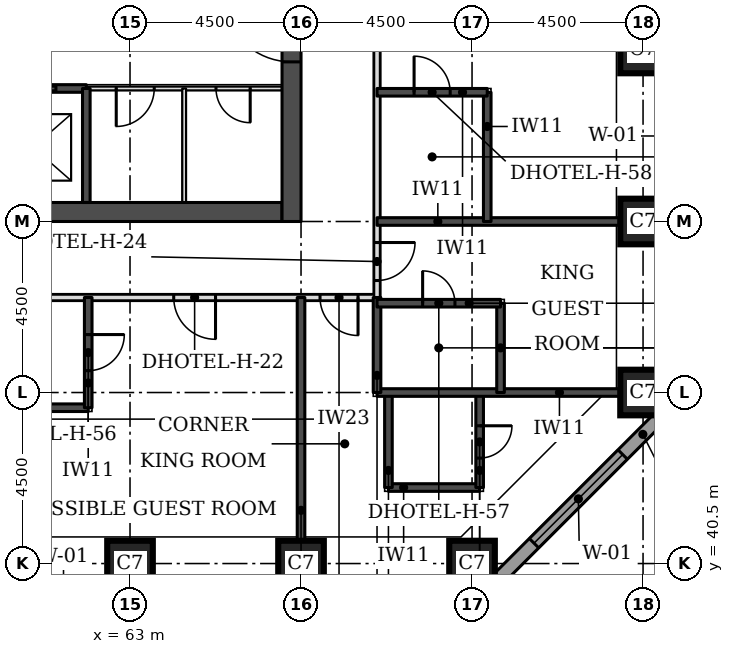
"""IFC4 building model, lengths in metres.
Left out: names, types, materials, properties, quantities, classifications, styles, units other than length and angle.
Written with IfcOpenShell. Run it as: python <this file> out.ifc"""

import sys

from ifc_helpers import new_model, si_unit, direction, frame, frame_2d, origin, origin_2d, place, context, subcontext, project, spatial, rectangle, extrude, element, fill, save


model = new_model("IFC4")
c1 = context("Model", 3, precision=1e-05, world=origin(), true_north=direction((0.0, 1.0)))
c2 = subcontext(c1, "Body", "Model", "MODEL_VIEW")
j1 = project(units=[si_unit("LENGTHUNIT", "METRE"), si_unit("PLANEANGLEUNIT", "RADIAN")], contexts=[c1])
p1 = place(None, origin())
s1 = spatial("IfcSite", under=j1, at=p1, CompositionType="ELEMENT")
p2 = place(p1, origin())
s2 = spatial("IfcBuilding", under=s1, at=p2, CompositionType="ELEMENT")
p3 = place(p2, frame((0.0, 0.0, 46.2)))
s3 = spatial("IfcBuildingStorey", under=s2, at=p3, CompositionType="ELEMENT", Elevation=46.2)
for number, where, z_axis, x_axis in (
    (1, (63.0, 40.5, 0.0), (0.0, 0.0, 1.0), (1.0, 0.0, 0.0)),
    (2, (67.5, 40.5, 0.0), (0.0, 0.0, 1.0), (1.0, 0.0, 0.0)),
    (3, (72.0, 40.5, 0.0), (0.0, 0.0, 1.0), (1.0, 0.0, 0.0)),
    (4, (76.5, 45.0, 0.0), (0.0, 0.0, 1.0), (1.0, 0.0, 0.0)),
    (5, (76.5, 49.5, 0.0), (0.0, 0.0, 1.0), (1.0, 0.0, 0.0)),
    (6, (76.5, 54.0, 0.0), (0.0, 0.0, 1.0), (1.0, 0.0, 0.0)),
):
    element("IfcColumn", number, at=place(p3, frame(where, z_axis=z_axis, x_axis=x_axis)), inside=s3, PredefinedType="COLUMN", context=c2, shape_type="SweptSolid", body=[
        extrude(rectangle(XDim=1.2, YDim=1.2, at=origin_2d()), origin(), (0.0, 0.0, 1.0), 3.3),
    ])
p4 = place(p3, frame((45.5, 49.75, 0.0), z_axis=(0.0, 0.0, 1.0), x_axis=(1.0, 0.0, 0.0)))
e7 = element("IfcWall", 7, at=p4, inside=s3, PredefinedType="SHEAR", context=c2, shape_type="SweptSolid", body=[
    extrude(rectangle(XDim=21.5, YDim=0.5, at=frame_2d((10.75, 0.0))), origin(), (0.0, 0.0, 1.0), 3.3),
])
p5 = place(p3, frame((67.25, 49.5, 0.0), z_axis=(0.0, 0.0, 1.0), x_axis=(0.0, 1.0, 0.0)))
e8 = element("IfcWall", 8, at=p5, inside=s3, PredefinedType="SHEAR", context=c2, shape_type="SweptSolid", body=[
    extrude(rectangle(XDim=22.5, YDim=0.5, at=frame_2d((11.25, 0.0))), origin(), (0.0, 0.0, 1.0), 3.3),
])
p6 = place(p5, frame((4.2, 0.0, 0.0)))
e9 = element("IfcOpeningElement", 9, at=p6, cuts=e8, PredefinedType="OPENING", context=c2, shape_type="SweptSolid", body=[
    extrude(rectangle(XDim=1.8, YDim=2.1, at=frame_2d((0.9, 1.05))), frame((0.0, 0.26, 0.0), z_axis=(0.0, -1.0, 0.0), x_axis=(1.0, 0.0, 0.0)), (0.0, 0.0, 1.0), 0.52),
])
p7 = place(p5, frame((6.9, 0.0, 0.0)))
e10 = element("IfcOpeningElement", 10, at=p7, cuts=e8, PredefinedType="OPENING", context=c2, shape_type="SweptSolid", body=[
    extrude(rectangle(XDim=1.1, YDim=2.1, at=frame_2d((0.55, 1.05))), frame((0.0, 0.26, 0.0), z_axis=(0.0, -1.0, 0.0), x_axis=(1.0, 0.0, 0.0)), (0.0, 0.0, 1.0), 0.52),
])
p8 = place(p5, frame((13.6, 0.0, 0.0)))
e11 = element("IfcOpeningElement", 11, at=p8, cuts=e8, PredefinedType="OPENING", context=c2, shape_type="SweptSolid", body=[
    extrude(rectangle(XDim=1.1, YDim=2.1, at=frame_2d((0.55, 1.05))), frame((0.0, 0.26, 0.0), z_axis=(0.0, -1.0, 0.0), x_axis=(1.0, 0.0, 0.0)), (0.0, 0.0, 1.0), 0.52),
])
p9 = place(p5, frame((16.5, 0.0, 0.0)))
e12 = element("IfcOpeningElement", 12, at=p9, cuts=e8, PredefinedType="OPENING", context=c2, shape_type="SweptSolid", body=[
    extrude(rectangle(XDim=1.8, YDim=2.1, at=frame_2d((0.9, 1.05))), frame((0.0, 0.26, 0.0), z_axis=(0.0, -1.0, 0.0), x_axis=(1.0, 0.0, 0.0)), (0.0, 0.0, 1.0), 0.52),
])
p10 = place(p3, frame((72.27, 39.674, 0.0), z_axis=(0.0, 0.0, 1.0), x_axis=(0.707106781187, 0.707106781187, 0.0)))
e13 = element("IfcWall", 13, at=p10, inside=s3, PredefinedType="STANDARD", context=c2, shape_type="SweptSolid", body=[
    extrude(rectangle(XDim=7.151, YDim=0.35, at=frame_2d((3.576, 0.0))), origin(), (0.0, 0.0, 1.0), 3.055),
])
p11 = place(p10, frame((1.926, 0.0, 0.8)))
e14 = element("IfcOpeningElement", 14, at=p11, cuts=e13, PredefinedType="OPENING", context=c2, shape_type="SweptSolid", body=[
    extrude(rectangle(XDim=3.3, YDim=1.5, at=frame_2d((1.65, 0.75))), frame((0.0, 0.185, 0.0), z_axis=(0.0, -1.0, 0.0), x_axis=(1.0, 0.0, 0.0)), (0.0, 0.0, 1.0), 0.37),
])
p12 = place(p3, frame((51.5, 47.5, 0.0), z_axis=(0.0, 0.0, 1.0), x_axis=(1.0, 0.0, 0.0)))
e15 = element("IfcWall", 15, at=p12, inside=s3, PredefinedType="PARTITIONING", context=c2, shape_type="SweptSolid", body=[
    extrude(rectangle(XDim=18.0, YDim=0.15, at=frame_2d((9.0, 0.0))), origin(), (0.0, 0.0, 1.0), 3.08),
])
p13 = place(p12, frame((12.65, 0.0, 0.0)))
e16 = element("IfcOpeningElement", 16, at=p13, cuts=e15, PredefinedType="OPENING", context=c2, shape_type="SweptSolid", body=[
    extrude(rectangle(XDim=1.1, YDim=2.1, at=frame_2d((0.55, 1.05))), frame((0.0, 0.085, 0.0), z_axis=(0.0, -1.0, 0.0), x_axis=(1.0, 0.0, 0.0)), (0.0, 0.0, 1.0), 0.17),
])
p14 = place(p12, frame((16.5, 0.0, 0.0)))
e17 = element("IfcOpeningElement", 17, at=p14, cuts=e15, PredefinedType="OPENING", context=c2, shape_type="SweptSolid", body=[
    extrude(rectangle(XDim=1.0, YDim=2.1, at=frame_2d((0.5, 1.05))), frame((0.0, 0.085, 0.0), z_axis=(0.0, -1.0, 0.0), x_axis=(1.0, 0.0, 0.0)), (0.0, 0.0, 1.0), 0.17),
])
p15 = place(p12, frame((4.21, 0.0, 0.0)))
e18 = element("IfcOpeningElement", 18, at=p15, cuts=e15, PredefinedType="OPENING", context=c2, shape_type="SweptSolid", body=[
    extrude(rectangle(XDim=1.0, YDim=2.1, at=frame_2d((0.5, 1.05))), frame((0.0, 0.085, 0.0), z_axis=(0.0, -1.0, 0.0), x_axis=(1.0, 0.0, 0.0)), (0.0, 0.0, 1.0), 0.17),
])
p16 = place(p3, frame((69.5, 47.5, 0.0), z_axis=(0.0, 0.0, 1.0), x_axis=(0.0, 1.0, 0.0)))
e19 = element("IfcWall", 19, at=p16, inside=s3, PredefinedType="PARTITIONING", context=c2, shape_type="SweptSolid", body=[
    extrude(rectangle(XDim=26.5, YDim=0.15, at=frame_2d((13.25, 0.0))), origin(), (0.0, 0.0, 1.0), 3.08),
])
p17 = place(p16, frame((25.053, 0.0, 0.0)))
e20 = element("IfcOpeningElement", 20, at=p17, cuts=e19, PredefinedType="OPENING", context=c2, shape_type="SweptSolid", body=[
    extrude(rectangle(XDim=1.0, YDim=2.1, at=frame_2d((0.5, 1.05))), frame((0.0, 0.085, 0.0), z_axis=(0.0, -1.0, 0.0), x_axis=(1.0, 0.0, 0.0)), (0.0, 0.0, 1.0), 0.17),
])
p18 = place(p16, frame((20.575, 0.0, 0.0)))
e21 = element("IfcOpeningElement", 21, at=p18, cuts=e19, PredefinedType="OPENING", context=c2, shape_type="SweptSolid", body=[
    extrude(rectangle(XDim=1.0, YDim=2.1, at=frame_2d((0.5, 1.05))), frame((0.0, 0.085, 0.0), z_axis=(0.0, -1.0, 0.0), x_axis=(1.0, 0.0, 0.0)), (0.0, 0.0, 1.0), 0.17),
])
p19 = place(p16, frame((18.175, 0.0, 0.0)))
e22 = element("IfcOpeningElement", 22, at=p19, cuts=e19, PredefinedType="OPENING", context=c2, shape_type="SweptSolid", body=[
    extrude(rectangle(XDim=1.0, YDim=2.1, at=frame_2d((0.5, 1.05))), frame((0.0, 0.085, 0.0), z_axis=(0.0, -1.0, 0.0), x_axis=(1.0, 0.0, 0.0)), (0.0, 0.0, 1.0), 0.17),
])
p20 = place(p16, frame((11.575, 0.0, 0.0)))
e23 = element("IfcOpeningElement", 23, at=p20, cuts=e19, PredefinedType="OPENING", context=c2, shape_type="SweptSolid", body=[
    extrude(rectangle(XDim=1.0, YDim=2.1, at=frame_2d((0.5, 1.05))), frame((0.0, 0.085, 0.0), z_axis=(0.0, -1.0, 0.0), x_axis=(1.0, 0.0, 0.0)), (0.0, 0.0, 1.0), 0.17),
])
p21 = place(p16, frame((7.65, 0.0, 0.0)))
e24 = element("IfcOpeningElement", 24, at=p21, cuts=e19, PredefinedType="OPENING", context=c2, shape_type="SweptSolid", body=[
    extrude(rectangle(XDim=1.1, YDim=2.1, at=frame_2d((0.55, 1.05))), frame((0.0, 0.085, 0.0), z_axis=(0.0, -1.0, 0.0), x_axis=(1.0, 0.0, 0.0)), (0.0, 0.0, 1.0), 0.17),
])
p22 = place(p16, frame((0.447, 0.0, 0.0)))
e25 = element("IfcOpeningElement", 25, at=p22, cuts=e19, PredefinedType="OPENING", context=c2, shape_type="SweptSolid", body=[
    extrude(rectangle(XDim=1.0, YDim=2.1, at=frame_2d((0.5, 1.05))), frame((0.0, 0.085, 0.0), z_axis=(0.0, -1.0, 0.0), x_axis=(1.0, 0.0, 0.0)), (0.0, 0.0, 1.0), 0.17),
])
p23 = place(p3, frame((67.5, 41.1, 0.0), z_axis=(0.0, 0.0, 1.0), x_axis=(0.0, 1.0, 0.0)))
e26 = element("IfcWall", 26, at=p23, inside=s3, PredefinedType="SOLIDWALL", context=c2, shape_type="SweptSolid", body=[
    extrude(rectangle(XDim=6.4, YDim=0.2, at=frame_2d((3.2, 0.0))), origin(), (0.0, 0.0, 1.0), 3.08),
])
p24 = place(p3, frame((69.8, 42.5, 0.0), z_axis=(0.0, 0.0, 1.0), x_axis=(1.0, 0.0, 0.0)))
e27 = element("IfcWall", 27, at=p24, inside=s3, PredefinedType="SOLIDWALL", context=c2, shape_type="SweptSolid", body=[
    extrude(rectangle(XDim=2.4, YDim=0.2, at=frame_2d((1.2, 0.0))), origin(), (0.0, 0.0, 1.0), 3.08),
])
p25 = place(p3, frame((69.8, 42.5, 0.0), z_axis=(0.0, 0.0, 1.0), x_axis=(0.0, 1.0, 0.0)))
e28 = element("IfcWall", 28, at=p25, inside=s3, PredefinedType="SOLIDWALL", context=c2, shape_type="SweptSolid", body=[
    extrude(rectangle(XDim=2.5, YDim=0.2, at=frame_2d((1.25, 0.0))), origin(), (0.0, 0.0, 1.0), 3.08),
])
p26 = place(p3, frame((72.2, 42.5, 0.0), z_axis=(0.0, 0.0, 1.0), x_axis=(0.0, 1.0, 0.0)))
e29 = element("IfcWall", 29, at=p26, inside=s3, PredefinedType="SOLIDWALL", context=c2, shape_type="SweptSolid", body=[
    extrude(rectangle(XDim=2.5, YDim=0.2, at=frame_2d((1.25, 0.0))), origin(), (0.0, 0.0, 1.0), 3.08),
])
p27 = place(p26, frame((0.775, 0.0, 0.0)))
e30 = element("IfcOpeningElement", 30, at=p27, cuts=e29, PredefinedType="OPENING", context=c2, shape_type="SweptSolid", body=[
    extrude(rectangle(XDim=0.85, YDim=2.1, at=frame_2d((0.425, 1.05))), frame((0.0, 0.11, 0.0), z_axis=(0.0, -1.0, 0.0), x_axis=(1.0, 0.0, 0.0)), (0.0, 0.0, 1.0), 0.22),
])
p28 = place(p3, frame((58.5, 44.6, 0.0), z_axis=(0.0, 0.0, 1.0), x_axis=(1.0, 0.0, 0.0)))
e31 = element("IfcWall", 31, at=p28, inside=s3, PredefinedType="SOLIDWALL", context=c2, shape_type="SweptSolid", body=[
    extrude(rectangle(XDim=3.4, YDim=0.2, at=frame_2d((1.7, 0.0))), origin(), (0.0, 0.0, 1.0), 3.08),
])
p29 = place(p3, frame((61.9, 44.6, 0.0), z_axis=(0.0, 0.0, 1.0), x_axis=(0.0, 1.0, 0.0)))
e32 = element("IfcWall", 32, at=p29, inside=s3, PredefinedType="SOLIDWALL", context=c2, shape_type="SweptSolid", body=[
    extrude(rectangle(XDim=2.9, YDim=0.2, at=frame_2d((1.45, 0.0))), origin(), (0.0, 0.0, 1.0), 3.08),
])
p30 = place(p29, frame((0.975, 0.0, 0.0)))
e33 = element("IfcOpeningElement", 33, at=p30, cuts=e32, PredefinedType="OPENING", context=c2, shape_type="SweptSolid", body=[
    extrude(rectangle(XDim=0.95, YDim=2.1, at=frame_2d((0.475, 1.05))), frame((0.0, 0.11, 0.0), z_axis=(0.0, -1.0, 0.0), x_axis=(1.0, 0.0, 0.0)), (0.0, 0.0, 1.0), 0.22),
])
p31 = place(p3, frame((69.5, 45.0, 0.0), z_axis=(0.0, 0.0, 1.0), x_axis=(1.0, 0.0, 0.0)))
e34 = element("IfcWall", 34, at=p31, inside=s3, PredefinedType="SOLIDWALL", context=c2, shape_type="SweptSolid", body=[
    extrude(rectangle(XDim=6.4, YDim=0.2, at=frame_2d((3.2, 0.0))), origin(), (0.0, 0.0, 1.0), 3.08),
])
p32 = place(p3, frame((69.5, 45.0, 0.0), z_axis=(0.0, 0.0, 1.0), x_axis=(0.0, 1.0, 0.0)))
e35 = element("IfcWall", 35, at=p32, inside=s3, PredefinedType="SOLIDWALL", context=c2, shape_type="SweptSolid", body=[
    extrude(rectangle(XDim=2.5, YDim=0.2, at=frame_2d((1.25, 0.0))), origin(), (0.0, 0.0, 1.0), 3.08),
])
p33 = place(p3, frame((72.75, 45.0, 0.0), z_axis=(0.0, 0.0, 1.0), x_axis=(0.0, 1.0, 0.0)))
e36 = element("IfcWall", 36, at=p33, inside=s3, PredefinedType="SOLIDWALL", context=c2, shape_type="SweptSolid", body=[
    extrude(rectangle(XDim=2.35, YDim=0.2, at=frame_2d((1.175, 0.0))), origin(), (0.0, 0.0, 1.0), 3.08),
])
p34 = place(p3, frame((69.5, 47.35, 0.0), z_axis=(0.0, 0.0, 1.0), x_axis=(1.0, 0.0, 0.0)))
e37 = element("IfcWall", 37, at=p34, inside=s3, PredefinedType="SOLIDWALL", context=c2, shape_type="SweptSolid", body=[
    extrude(rectangle(XDim=3.25, YDim=0.2, at=frame_2d((1.625, 0.0))), origin(), (0.0, 0.0, 1.0), 3.08),
])
p35 = place(p34, frame((1.2, 0.0, 0.0)))
e38 = element("IfcOpeningElement", 38, at=p35, cuts=e37, PredefinedType="OPENING", context=c2, shape_type="SweptSolid", body=[
    extrude(rectangle(XDim=0.85, YDim=2.1, at=frame_2d((0.425, 1.05))), frame((0.0, 0.11, 0.0), z_axis=(0.0, -1.0, 0.0), x_axis=(1.0, 0.0, 0.0)), (0.0, 0.0, 1.0), 0.22),
])
p36 = place(p3, frame((69.5, 49.5, 0.0), z_axis=(0.0, 0.0, 1.0), x_axis=(1.0, 0.0, 0.0)))
e39 = element("IfcWall", 39, at=p36, inside=s3, PredefinedType="SOLIDWALL", context=c2, shape_type="SweptSolid", body=[
    extrude(rectangle(XDim=6.4, YDim=0.2, at=frame_2d((3.2, 0.0))), origin(), (0.0, 0.0, 1.0), 3.08),
])
p37 = place(p3, frame((72.4, 49.5, 0.0), z_axis=(0.0, 0.0, 1.0), x_axis=(0.0, 1.0, 0.0)))
e40 = element("IfcWall", 40, at=p37, inside=s3, PredefinedType="SOLIDWALL", context=c2, shape_type="SweptSolid", body=[
    extrude(rectangle(XDim=3.4, YDim=0.2, at=frame_2d((1.7, 0.0))), origin(), (0.0, 0.0, 1.0), 3.08),
])
p38 = place(p3, frame((69.5, 52.9, 0.0), z_axis=(0.0, 0.0, 1.0), x_axis=(1.0, 0.0, 0.0)))
e41 = element("IfcWall", 41, at=p38, inside=s3, PredefinedType="SOLIDWALL", context=c2, shape_type="SweptSolid", body=[
    extrude(rectangle(XDim=2.9, YDim=0.2, at=frame_2d((1.45, 0.0))), origin(), (0.0, 0.0, 1.0), 3.08),
])
p39 = place(p38, frame((0.975, 0.0, 0.0)))
e42 = element("IfcOpeningElement", 42, at=p39, cuts=e41, PredefinedType="OPENING", context=c2, shape_type="SweptSolid", body=[
    extrude(rectangle(XDim=0.95, YDim=2.1, at=frame_2d((0.475, 1.05))), frame((0.0, 0.11, 0.0), z_axis=(0.0, -1.0, 0.0), x_axis=(1.0, 0.0, 0.0)), (0.0, 0.0, 1.0), 0.22),
])
p40 = place(p3, frame((61.85, 53.0, 0.0), z_axis=(0.0, 0.0, 1.0), x_axis=(1.0, 0.0, 0.0)))
e43 = element("IfcWall", 43, at=p40, inside=s3, PredefinedType="PARTITIONING", context=c2, shape_type="SweptSolid", body=[
    extrude(rectangle(XDim=5.15, YDim=0.1, at=frame_2d((2.575, 0.0))), origin(), (0.0, 0.0, 1.0), 3.08),
])
p41 = place(p40, frame((3.413, 0.0, 0.0)))
e44 = element("IfcOpeningElement", 44, at=p41, cuts=e43, PredefinedType="OPENING", context=c2, shape_type="SweptSolid", body=[
    extrude(rectangle(XDim=0.9, YDim=2.1, at=frame_2d((0.45, 1.05))), frame((0.0, 0.06, 0.0), z_axis=(0.0, -1.0, 0.0), x_axis=(1.0, 0.0, 0.0)), (0.0, 0.0, 1.0), 0.12),
])
p42 = place(p40, frame((0.788, 0.0, 0.0)))
e45 = element("IfcOpeningElement", 45, at=p42, cuts=e43, PredefinedType="OPENING", context=c2, shape_type="SweptSolid", body=[
    extrude(rectangle(XDim=1.0, YDim=2.1, at=frame_2d((0.5, 1.05))), frame((0.0, 0.06, 0.0), z_axis=(0.0, -1.0, 0.0), x_axis=(1.0, 0.0, 0.0)), (0.0, 0.0, 1.0), 0.12),
])
p43 = place(p3, frame((50.65, 53.0, 0.0), z_axis=(0.0, 0.0, 1.0), x_axis=(1.0, 0.0, 0.0)))
e46 = element("IfcWall", 46, at=p43, inside=s3, PredefinedType="SOLIDWALL", context=c2, shape_type="SweptSolid", body=[
    extrude(rectangle(XDim=11.2, YDim=0.2, at=frame_2d((5.6, 0.0))), origin(), (0.0, 0.0, 1.0), 3.08),
])
p44 = place(p43, frame((0.8, 0.0, 0.0)))
e47 = element("IfcOpeningElement", 47, at=p44, cuts=e46, PredefinedType="OPENING", context=c2, shape_type="SweptSolid", body=[
    extrude(rectangle(XDim=1.2, YDim=2.1, at=frame_2d((0.6, 1.05))), frame((0.0, 0.11, 0.0), z_axis=(0.0, -1.0, 0.0), x_axis=(1.0, 0.0, 0.0)), (0.0, 0.0, 1.0), 0.22),
])
p45 = place(p43, frame((3.6, 0.0, 0.0)))
e48 = element("IfcOpeningElement", 48, at=p45, cuts=e46, PredefinedType="OPENING", context=c2, shape_type="SweptSolid", body=[
    extrude(rectangle(XDim=1.2, YDim=2.1, at=frame_2d((0.6, 1.05))), frame((0.0, 0.11, 0.0), z_axis=(0.0, -1.0, 0.0), x_axis=(1.0, 0.0, 0.0)), (0.0, 0.0, 1.0), 0.22),
])
p46 = place(p43, frame((6.4, 0.0, 0.0)))
e49 = element("IfcOpeningElement", 49, at=p46, cuts=e46, PredefinedType="OPENING", context=c2, shape_type="SweptSolid", body=[
    extrude(rectangle(XDim=1.2, YDim=2.1, at=frame_2d((0.6, 1.05))), frame((0.0, 0.11, 0.0), z_axis=(0.0, -1.0, 0.0), x_axis=(1.0, 0.0, 0.0)), (0.0, 0.0, 1.0), 0.22),
])
p47 = place(p43, frame((9.2, 0.0, 0.0)))
e50 = element("IfcOpeningElement", 50, at=p47, cuts=e46, PredefinedType="OPENING", context=c2, shape_type="SweptSolid", body=[
    extrude(rectangle(XDim=1.2, YDim=2.1, at=frame_2d((0.6, 1.05))), frame((0.0, 0.11, 0.0), z_axis=(0.0, -1.0, 0.0), x_axis=(1.0, 0.0, 0.0)), (0.0, 0.0, 1.0), 0.22),
])
p48 = place(p3, frame((61.85, 50.0, 0.0), z_axis=(0.0, 0.0, 1.0), x_axis=(0.0, 1.0, 0.0)))
e51 = element("IfcWall", 51, at=p48, inside=s3, PredefinedType="SOLIDWALL", context=c2, shape_type="SweptSolid", body=[
    extrude(rectangle(XDim=3.0, YDim=0.2, at=frame_2d((1.5, 0.0))), origin(), (0.0, 0.0, 1.0), 3.08),
])
p49 = place(p3, frame((64.425, 50.0, 0.0), z_axis=(0.0, 0.0, 1.0), x_axis=(0.0, 1.0, 0.0)))
e52 = element("IfcWall", 52, at=p49, inside=s3, PredefinedType="PARTITIONING", context=c2, shape_type="SweptSolid", body=[
    extrude(rectangle(XDim=3.0, YDim=0.1, at=frame_2d((1.5, 0.0))), origin(), (0.0, 0.0, 1.0), 3.08),
])
p50 = place(p11, origin())
e53 = element("IfcWindow", 53, at=p50, inside=s3, PartitioningType="SINGLE_PANEL", PredefinedType="WINDOW", context=c2, shape_type="SweptSolid", body=[
    extrude(rectangle(XDim=3.3, YDim=1.5, at=frame_2d((1.65, 0.75))), frame((0.0, 0.085, 0.0), z_axis=(0.0, -1.0, 0.0), x_axis=(1.0, 0.0, 0.0)), (0.0, 0.0, 1.0), 0.06),
])
fill(e14, e53)
p51 = place(p39, origin())
e54 = element("IfcDoor", 54, at=p51, inside=s3, OperationType="SINGLE_SWING_LEFT", PredefinedType="DOOR", context=c2, shape_type="SweptSolid", body=[
    extrude(rectangle(XDim=0.95, YDim=2.1, at=frame_2d((0.475, 1.05))), frame((0.0, 0.025, 0.0), z_axis=(0.0, -1.0, 0.0), x_axis=(1.0, 0.0, 0.0)), (0.0, 0.0, 1.0), 0.05),
])
fill(e42, e54)
p52 = place(p22, frame((1.0, 0.0, 0.0), z_axis=(0.0, 0.0, 1.0), x_axis=(-1.0, 0.0, 0.0)))
e55 = element("IfcDoor", 55, at=p52, inside=s3, OperationType="SINGLE_SWING_LEFT", PredefinedType="DOOR", context=c2, shape_type="SweptSolid", body=[
    extrude(rectangle(XDim=1.0, YDim=2.1, at=frame_2d((0.5, 1.05))), frame((0.0, 0.025, 0.0), z_axis=(0.0, -1.0, 0.0), x_axis=(1.0, 0.0, 0.0)), (0.0, 0.0, 1.0), 0.05),
])
fill(e25, e55)
p53 = place(p35, origin())
e56 = element("IfcDoor", 56, at=p53, inside=s3, OperationType="SINGLE_SWING_LEFT", PredefinedType="DOOR", context=c2, shape_type="SweptSolid", body=[
    extrude(rectangle(XDim=0.85, YDim=2.1, at=frame_2d((0.425, 1.05))), frame((0.0, 0.025, 0.0), z_axis=(0.0, -1.0, 0.0), x_axis=(1.0, 0.0, 0.0)), (0.0, 0.0, 1.0), 0.05),
])
fill(e38, e56)
p54 = place(p13, frame((1.1, 0.0, 0.0), z_axis=(0.0, 0.0, 1.0), x_axis=(-1.0, 0.0, 0.0)))
e57 = element("IfcDoor", 57, at=p54, inside=s3, OperationType="SINGLE_SWING_LEFT", PredefinedType="DOOR", context=c2, shape_type="SweptSolid", body=[
    extrude(rectangle(XDim=1.1, YDim=2.1, at=frame_2d((0.55, 1.05))), frame((0.0, 0.025, 0.0), z_axis=(0.0, -1.0, 0.0), x_axis=(1.0, 0.0, 0.0)), (0.0, 0.0, 1.0), 0.05),
])
fill(e16, e57)
p55 = place(p30, frame((0.95, 0.0, 0.0), z_axis=(0.0, 0.0, 1.0), x_axis=(-1.0, 0.0, 0.0)))
e58 = element("IfcDoor", 58, at=p55, inside=s3, OperationType="SINGLE_SWING_LEFT", PredefinedType="DOOR", context=c2, shape_type="SweptSolid", body=[
    extrude(rectangle(XDim=0.95, YDim=2.1, at=frame_2d((0.475, 1.05))), frame((0.0, 0.025, 0.0), z_axis=(0.0, -1.0, 0.0), x_axis=(1.0, 0.0, 0.0)), (0.0, 0.0, 1.0), 0.05),
])
fill(e33, e58)
p56 = place(p14, frame((1.0, 0.0, 0.0), z_axis=(0.0, 0.0, 1.0), x_axis=(-1.0, 0.0, 0.0)))
e59 = element("IfcDoor", 59, at=p56, inside=s3, OperationType="SINGLE_SWING_LEFT", PredefinedType="DOOR", context=c2, shape_type="SweptSolid", body=[
    extrude(rectangle(XDim=1.0, YDim=2.1, at=frame_2d((0.5, 1.05))), frame((0.0, 0.025, 0.0), z_axis=(0.0, -1.0, 0.0), x_axis=(1.0, 0.0, 0.0)), (0.0, 0.0, 1.0), 0.05),
])
fill(e17, e59)
p57 = place(p27, frame((0.85, 0.0, 0.0), z_axis=(0.0, 0.0, 1.0), x_axis=(-1.0, 0.0, 0.0)))
e60 = element("IfcDoor", 60, at=p57, inside=s3, OperationType="SINGLE_SWING_LEFT", PredefinedType="DOOR", context=c2, shape_type="SweptSolid", body=[
    extrude(rectangle(XDim=0.85, YDim=2.1, at=frame_2d((0.425, 1.05))), frame((0.0, 0.025, 0.0), z_axis=(0.0, -1.0, 0.0), x_axis=(1.0, 0.0, 0.0)), (0.0, 0.0, 1.0), 0.05),
])
fill(e30, e60)
p58 = place(p47, origin())
e61 = element("IfcDoor", 61, at=p58, inside=s3, OperationType="DOUBLE_DOOR_SLIDING", PredefinedType="DOOR", context=c2, shape_type="SweptSolid", body=[
    extrude(rectangle(XDim=1.2, YDim=2.1, at=frame_2d((0.6, 1.05))), frame((0.0, 0.025, 0.0), z_axis=(0.0, -1.0, 0.0), x_axis=(1.0, 0.0, 0.0)), (0.0, 0.0, 1.0), 0.05),
])
fill(e50, e61)
p59 = place(p6, origin())
e62 = element("IfcDoor", 62, at=p59, inside=s3, OperationType="SINGLE_SWING_RIGHT", PredefinedType="DOOR", context=c2, shape_type="SweptSolid", body=[
    extrude(rectangle(XDim=1.8, YDim=2.1, at=frame_2d((0.9, 1.05))), frame((0.0, 0.025, 0.0), z_axis=(0.0, -1.0, 0.0), x_axis=(1.0, 0.0, 0.0)), (0.0, 0.0, 1.0), 0.05),
])
fill(e9, e62)
p60 = place(p41, frame((0.9, 0.0, 0.0), z_axis=(0.0, 0.0, 1.0), x_axis=(-1.0, 0.0, 0.0)))
e63 = element("IfcDoor", 63, at=p60, inside=s3, OperationType="SINGLE_SWING_LEFT", PredefinedType="DOOR", context=c2, shape_type="SweptSolid", body=[
    extrude(rectangle(XDim=0.9, YDim=2.1, at=frame_2d((0.45, 1.05))), frame((0.0, 0.025, 0.0), z_axis=(0.0, -1.0, 0.0), x_axis=(1.0, 0.0, 0.0)), (0.0, 0.0, 1.0), 0.05),
])
fill(e44, e63)
p61 = place(p42, frame((1.0, 0.0, 0.0), z_axis=(0.0, 0.0, 1.0), x_axis=(-1.0, 0.0, 0.0)))
e64 = element("IfcDoor", 64, at=p61, inside=s3, OperationType="SINGLE_SWING_RIGHT", PredefinedType="DOOR", context=c2, shape_type="SweptSolid", body=[
    extrude(rectangle(XDim=1.0, YDim=2.1, at=frame_2d((0.5, 1.05))), frame((0.0, 0.025, 0.0), z_axis=(0.0, -1.0, 0.0), x_axis=(1.0, 0.0, 0.0)), (0.0, 0.0, 1.0), 0.05),
])
fill(e45, e64)
save(model, sys.argv[1])
